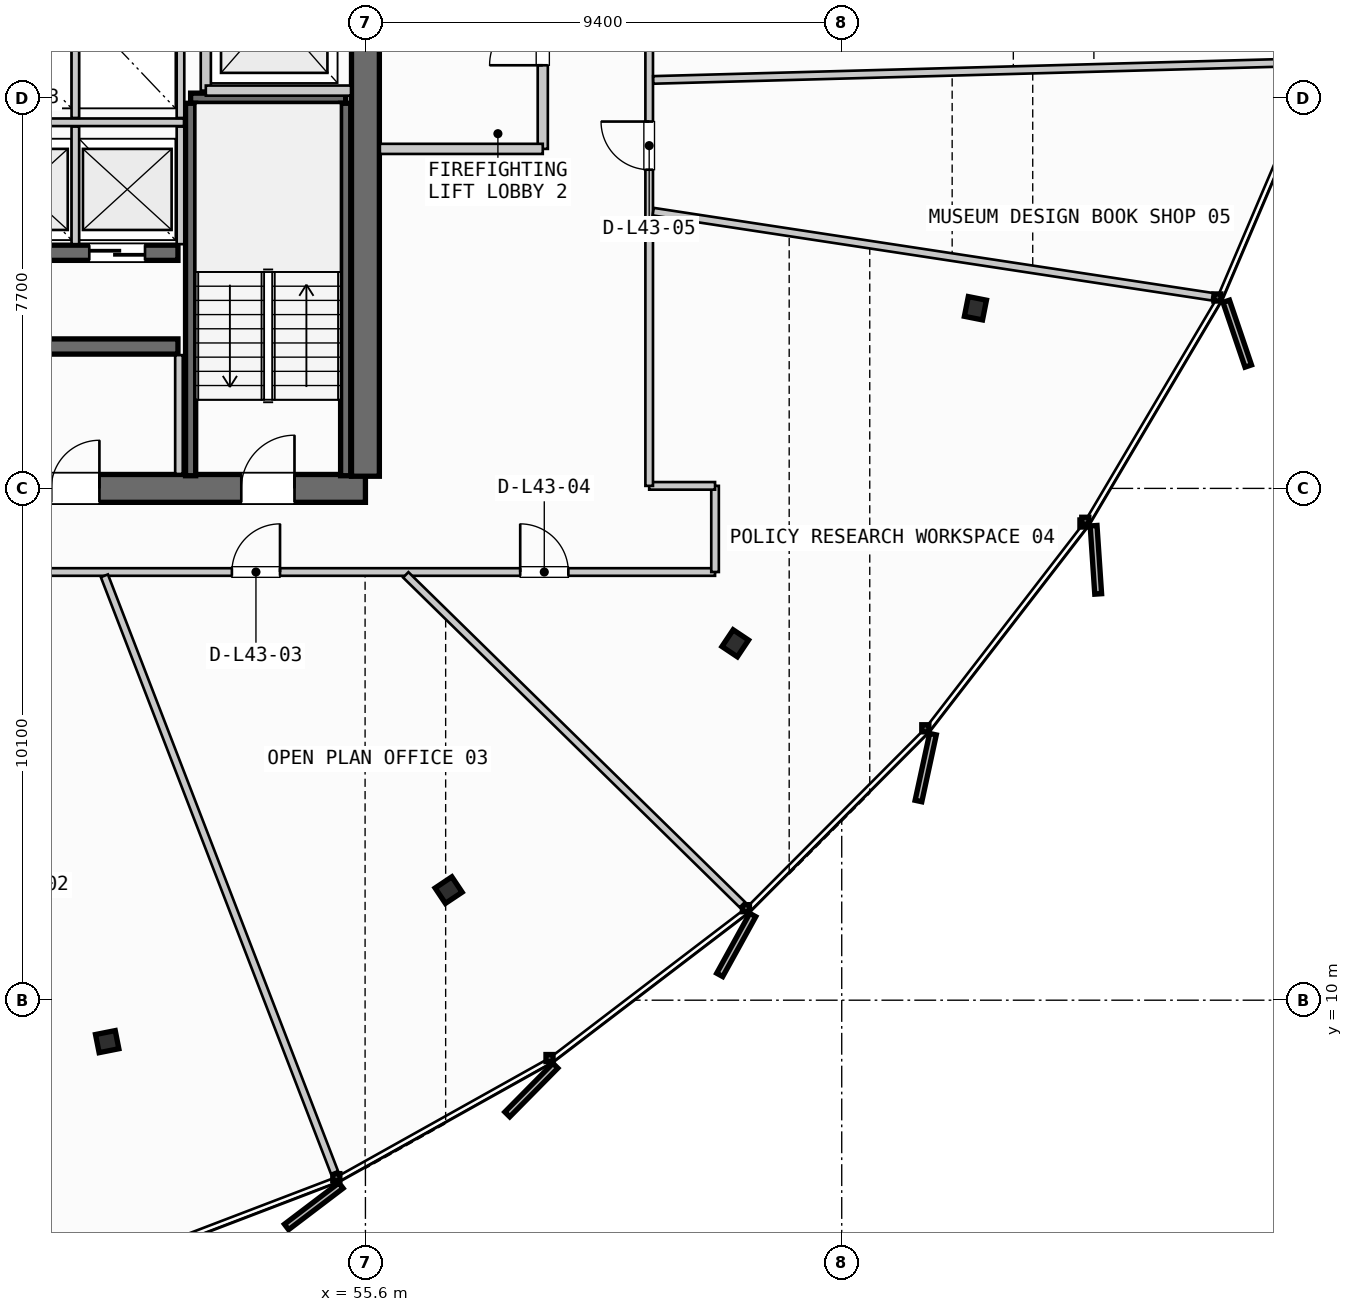
"""IFC4 building model, lengths in metres.
Left out: names, types, materials, properties, quantities, classifications, styles, units other than length and angle.
Written with IfcOpenShell. Run it as: python <this file> out.ifc"""

import sys

from ifc_helpers import new_model, si_unit, direction, frame, frame_2d, origin, origin_2d, place, context, subcontext, project, spatial, rectangle, i_section, extrude, source, transform, mapped, element, fill, save


model = new_model("IFC4")
c1 = context("Model", 3, precision=1e-05, world=origin(), true_north=direction((0.0, 1.0)))
c2 = subcontext(c1, "Body", "Model", "MODEL_VIEW")
j1 = project(units=[si_unit("LENGTHUNIT", "METRE"), si_unit("PLANEANGLEUNIT", "RADIAN")], contexts=[c1])
p1 = place(None, origin())
s1 = spatial("IfcSite", under=j1, at=p1, CompositionType="ELEMENT")
p2 = place(p1, origin())
s2 = spatial("IfcBuilding", under=s1, at=p2, CompositionType="ELEMENT")
p3 = place(p2, frame((0.0, 0.0, 167.85)))
s3 = spatial("IfcBuildingStorey", under=s2, at=p3, CompositionType="ELEMENT", Elevation=167.85)
p4 = place(p3, frame((38.0, 20.1, 0.0), z_axis=(0.0, 0.0, 1.0), x_axis=(1.0, 0.0, 0.0)))
e1 = element("IfcWall", 1, at=p4, inside=s3, PredefinedType="SHEAR", context=c2, shape_type="SweptSolid", body=[
    extrude(rectangle(XDim=17.6, YDim=0.55, at=frame_2d((8.8, 0.0))), origin(), (0.0, 0.0, 1.0), 3.24),
])
p5 = place(p4, frame((1.4, 0.0, 0.0)))
e2 = element("IfcOpeningElement", 2, at=p5, cuts=e1, PredefinedType="OPENING", context=c2, shape_type="SweptSolid", body=[
    extrude(rectangle(XDim=1.05, YDim=2.15, at=frame_2d((0.525, 1.075))), frame((0.0, 0.285, 0.0), z_axis=(0.0, -1.0, 0.0), x_axis=(1.0, 0.0, 0.0)), (0.0, 0.0, 1.0), 0.57),
])
p6 = place(p4, frame((15.15, 0.0, 0.0)))
e3 = element("IfcOpeningElement", 3, at=p6, cuts=e1, PredefinedType="OPENING", context=c2, shape_type="SweptSolid", body=[
    extrude(rectangle(XDim=1.05, YDim=2.15, at=frame_2d((0.525, 1.075))), frame((0.0, 0.285, 0.0), z_axis=(0.0, -1.0, 0.0), x_axis=(1.0, 0.0, 0.0)), (0.0, 0.0, 1.0), 0.57),
])
p7 = place(p4, frame((5.25, 0.0, 0.0)))
e4 = element("IfcOpeningElement", 4, at=p7, cuts=e1, PredefinedType="OPENING", context=c2, shape_type="SweptSolid", body=[
    extrude(rectangle(XDim=0.95, YDim=2.15, at=frame_2d((0.475, 1.075))), frame((0.0, 0.285, 0.0), z_axis=(0.0, -1.0, 0.0), x_axis=(1.0, 0.0, 0.0)), (0.0, 0.0, 1.0), 0.57),
])
p8 = place(p4, frame((11.4, 0.0, 0.0)))
e5 = element("IfcOpeningElement", 5, at=p8, cuts=e1, PredefinedType="OPENING", context=c2, shape_type="SweptSolid", body=[
    extrude(rectangle(XDim=0.95, YDim=2.15, at=frame_2d((0.475, 1.075))), frame((0.0, 0.285, 0.0), z_axis=(0.0, -1.0, 0.0), x_axis=(1.0, 0.0, 0.0)), (0.0, 0.0, 1.0), 0.57),
])
p9 = place(p3, frame((55.6, 20.34, 0.0), z_axis=(0.0, 0.0, 1.0), x_axis=(0.0, 1.0, 0.0)))
e6 = element("IfcWall", 6, at=p9, inside=s3, PredefinedType="SHEAR", context=c2, shape_type="SweptSolid", body=[
    extrude(rectangle(XDim=14.92, YDim=0.55, at=frame_2d((7.46, 0.0))), origin(), (0.0, 0.0, 1.0), 3.24),
])
p10 = place(p9, frame((12.71, 0.0, 0.0)))
e7 = element("IfcOpeningElement", 7, at=p10, cuts=e6, PredefinedType="OPENING", context=c2, shape_type="SweptSolid", body=[
    extrude(rectangle(XDim=1.05, YDim=2.15, at=frame_2d((0.525, 1.075))), frame((0.0, 0.285, 0.0), z_axis=(0.0, -1.0, 0.0), x_axis=(1.0, 0.0, 0.0)), (0.0, 0.0, 1.0), 0.57),
])
p11 = place(p9, frame((8.61, 0.0, 0.0)))
e8 = element("IfcOpeningElement", 8, at=p11, cuts=e6, PredefinedType="OPENING", context=c2, shape_type="SweptSolid", body=[
    extrude(rectangle(XDim=1.1, YDim=2.2, at=frame_2d((0.55, 1.1))), frame((0.0, 0.285, 0.0), z_axis=(0.0, -1.0, 0.0), x_axis=(1.0, 0.0, 0.0)), (0.0, 0.0, 1.0), 0.57),
])
p12 = place(p3, frame((47.65, 22.9, 0.0), z_axis=(0.0, 0.0, 1.0), x_axis=(1.0, 0.0, 0.0)))
e9 = element("IfcWall", 9, at=p12, inside=s3, PredefinedType="SHEAR", context=c2, shape_type="SweptSolid", body=[
    extrude(rectangle(XDim=4.25, YDim=0.3, at=frame_2d((2.125, 0.0))), origin(), (0.0, 0.0, 1.0), 3.24),
])
p13 = place(p3, frame((47.65, 24.75, 0.0), z_axis=(0.0, 0.0, 1.0), x_axis=(1.0, 0.0, 0.0)))
e10 = element("IfcWall", 10, at=p13, inside=s3, PredefinedType="SHEAR", context=c2, shape_type="SweptSolid", body=[
    extrude(rectangle(XDim=4.25, YDim=0.3, at=frame_2d((2.125, 0.0))), origin(), (0.0, 0.0, 1.0), 3.24),
])
p14 = place(p13, frame((0.45, 0.0, 0.0)))
e11 = element("IfcOpeningElement", 11, at=p14, cuts=e10, PredefinedType="OPENING", context=c2, shape_type="SweptSolid", body=[
    extrude(rectangle(XDim=1.1, YDim=2.2, at=frame_2d((0.55, 1.1))), frame((0.0, 0.16, 0.0), z_axis=(0.0, -1.0, 0.0), x_axis=(1.0, 0.0, 0.0)), (0.0, 0.0, 1.0), 0.32),
])
p15 = place(p13, frame((2.5, 0.0, 0.0)))
e12 = element("IfcOpeningElement", 12, at=p15, cuts=e10, PredefinedType="OPENING", context=c2, shape_type="SweptSolid", body=[
    extrude(rectangle(XDim=1.1, YDim=2.2, at=frame_2d((0.55, 1.1))), frame((0.0, 0.16, 0.0), z_axis=(0.0, -1.0, 0.0), x_axis=(1.0, 0.0, 0.0)), (0.0, 0.0, 1.0), 0.32),
])
m1 = source(origin(), c2, "Body", "SweptSolid", [
    extrude(i_section(OverallWidth=0.397, OverallDepth=0.365, WebThickness=0.028, FlangeThickness=0.044, FilletRadius=0.015, at=origin_2d()), origin(), (0.0, 0.0, 1.0), 3.24),
])
for number, where, z_axis, x_axis in (
    (13, (50.503, 9.182, 0.0), (0.0, 0.0, 1.0), (0.195, -0.981, 0.0)),
    (14, (57.242, 12.172, 0.0), (0.0, 0.0, 1.0), (0.556, -0.831, 0.0)),
    (15, (62.899, 17.043, 0.0), (0.0, 0.0, 1.0), (0.831, -0.556, 0.0)),
    (16, (67.639, 23.655, 0.0), (0.0, 0.0, 1.0), (0.981, -0.195, 0.0)),
):
    element("IfcColumn", number, at=place(p3, frame(where, z_axis=z_axis, x_axis=x_axis)), inside=s3, PredefinedType="COLUMN", context=c2, shape_type="MappedRepresentation", body=[
        mapped(m1, transform((0.0, 0.0, 0.0), scale=1.0)),
    ])
p16 = place(p3, frame((52.15, 27.8, 0.0), z_axis=(0.0, 0.0, 1.0), x_axis=(1.0, 0.0, 0.0)))
e17 = element("IfcWall", 17, at=p16, inside=s3, PredefinedType="SHEAR", context=c2, shape_type="SweptSolid", body=[
    extrude(rectangle(XDim=3.06, YDim=0.2, at=frame_2d((1.53, 0.0))), origin(), (0.0, 0.0, 1.0), 3.24),
])
for number, where, z_axis, x_axis in (
    (18, (55.21, 27.7, 0.0), (0.0, 0.0, 1.0), (0.0, -1.0, 0.0)),
    (19, (52.15, 20.35, 0.0), (0.0, 0.0, 1.0), (0.0, 1.0, 0.0)),
):
    element("IfcWall", number, at=place(p3, frame(where, z_axis=z_axis, x_axis=x_axis)), inside=s3, PredefinedType="SHEAR", context=c2, shape_type="SweptSolid", body=[
        extrude(rectangle(XDim=7.35, YDim=0.2, at=frame_2d((3.675, 0.0))), origin(), (0.0, 0.0, 1.0), 3.24),
    ])
p17 = place(p3, frame((52.45, 27.95, 0.0), z_axis=(0.0, 0.0, 1.0), x_axis=(0.0, 1.0, 0.0)))
e20 = element("IfcWall", 20, at=p17, inside=s3, PredefinedType="PARTITIONING", context=c2, shape_type="SweptSolid", body=[
    extrude(rectangle(XDim=3.1, YDim=0.2, at=frame_2d((1.55, 0.0))), origin(), (0.0, 0.0, 1.0), 2.28),
])
p18 = place(p3, frame((52.45, 27.95, 0.0), z_axis=(0.0, 0.0, 1.0), x_axis=(1.0, 0.0, 0.0)))
e21 = element("IfcWall", 21, at=p18, inside=s3, PredefinedType="PARTITIONING", context=c2, shape_type="SweptSolid", body=[
    extrude(rectangle(XDim=2.865, YDim=0.2, at=frame_2d((1.433, 0.0))), origin(), (0.0, 0.0, 1.0), 2.28),
])
p19 = place(p3, frame((59.1, 26.8, 0.0), z_axis=(0.0, 0.0, 1.0), x_axis=(0.0, 1.0, 0.0)))
e22 = element("IfcWall", 22, at=p19, inside=s3, PredefinedType="PARTITIONING", context=c2, shape_type="SweptSolid", body=[
    extrude(rectangle(XDim=4.4, YDim=0.2, at=frame_2d((2.2, 0.0))), origin(), (0.0, 0.0, 1.0), 2.28),
])
p20 = place(p19, frame((1.65, 0.0, 0.0)))
e23 = element("IfcOpeningElement", 23, at=p20, cuts=e22, PredefinedType="OPENING", context=c2, shape_type="SweptSolid", body=[
    extrude(rectangle(XDim=1.05, YDim=2.15, at=frame_2d((0.525, 1.075))), frame((0.0, 0.11, 0.0), z_axis=(0.0, -1.0, 0.0), x_axis=(1.0, 0.0, 0.0)), (0.0, 0.0, 1.0), 0.22),
])
p21 = place(p3, frame((55.885, 26.8, 0.0), z_axis=(0.0, 0.0, 1.0), x_axis=(1.0, 0.0, 0.0)))
e24 = element("IfcWall", 24, at=p21, inside=s3, PredefinedType="PARTITIONING", context=c2, shape_type="SweptSolid", body=[
    extrude(rectangle(XDim=3.215, YDim=0.2, at=frame_2d((1.607, 0.0))), origin(), (0.0, 0.0, 1.0), 2.28),
])
p22 = place(p3, frame((51.92, 20.385, 0.0), z_axis=(0.0, 0.0, 1.0), x_axis=(0.0, 1.0, 0.0)))
e25 = element("IfcWall", 25, at=p22, inside=s3, PredefinedType="PARTITIONING", context=c2, shape_type="SweptSolid", body=[
    extrude(rectangle(XDim=2.345, YDim=0.15, at=frame_2d((1.172, 0.0))), origin(), (0.0, 0.0, 1.0), 2.28),
])
p23 = place(p3, frame((47.7, 27.325, 0.0), z_axis=(0.0, 0.0, 1.0), x_axis=(1.0, 0.0, 0.0)))
e26 = element("IfcWall", 26, at=p23, inside=s3, PredefinedType="PARTITIONING", context=c2, shape_type="SweptSolid", body=[
    extrude(rectangle(XDim=4.32, YDim=0.15, at=frame_2d((2.16, 0.0))), origin(), (0.0, 0.0, 1.0), 2.28),
])
for number, where, z_axis, x_axis in (
    (27, (49.875, 24.92, 0.0), (0.0, 0.0, 1.0), (0.0, 1.0, 0.0)),
    (28, (51.95, 24.92, 0.0), (0.0, 0.0, 1.0), (0.0, 1.0, 0.0)),
):
    element("IfcWall", number, at=place(p3, frame(where, z_axis=z_axis, x_axis=x_axis)), inside=s3, PredefinedType="PARTITIONING", context=c2, shape_type="SweptSolid", body=[
        extrude(rectangle(XDim=2.32, YDim=0.15, at=frame_2d((1.16, 0.0))), origin(), (0.0, 0.0, 1.0), 2.28),
    ])
for number, where, z_axis, x_axis in (
    (29, (49.875, 27.41, 0.0), (0.0, 0.0, 1.0), (0.0, 1.0, 0.0)),
    (30, (51.95, 27.41, 0.0), (0.0, 0.0, 1.0), (0.0, 1.0, 0.0)),
):
    element("IfcWall", number, at=place(p3, frame(where, z_axis=z_axis, x_axis=x_axis)), inside=s3, PredefinedType="PARTITIONING", context=c2, shape_type="SweptSolid", body=[
        extrude(rectangle(XDim=2.27, YDim=0.15, at=frame_2d((1.135, 0.0))), origin(), (0.0, 0.0, 1.0), 2.28),
    ])
p24 = place(p3, frame((31.1, 18.45, 0.0), z_axis=(0.0, 0.0, 1.0), x_axis=(1.0, 0.0, 0.0)))
e31 = element("IfcWall", 31, at=p24, inside=s3, PredefinedType="PARTITIONING", context=c2, shape_type="SweptSolid", body=[
    extrude(rectangle(XDim=31.4, YDim=0.15, at=frame_2d((15.7, 0.0))), origin(), (0.0, 0.0, 1.0), 2.28),
])
p25 = place(p24, frame((7.969, 0.0, 0.0)))
e32 = element("IfcOpeningElement", 32, at=p25, cuts=e31, PredefinedType="OPENING", context=c2, shape_type="SweptSolid", body=[
    extrude(rectangle(XDim=0.95, YDim=2.15, at=frame_2d((0.475, 1.075))), frame((0.0, 0.085, 0.0), z_axis=(0.0, -1.0, 0.0), x_axis=(1.0, 0.0, 0.0)), (0.0, 0.0, 1.0), 0.17),
])
p26 = place(p24, frame((15.128, 0.0, 0.0)))
e33 = element("IfcOpeningElement", 33, at=p26, cuts=e31, PredefinedType="OPENING", context=c2, shape_type="SweptSolid", body=[
    extrude(rectangle(XDim=0.95, YDim=2.15, at=frame_2d((0.475, 1.075))), frame((0.0, 0.085, 0.0), z_axis=(0.0, -1.0, 0.0), x_axis=(1.0, 0.0, 0.0)), (0.0, 0.0, 1.0), 0.17),
])
p27 = place(p24, frame((21.865, 0.0, 0.0)))
e34 = element("IfcOpeningElement", 34, at=p27, cuts=e31, PredefinedType="OPENING", context=c2, shape_type="SweptSolid", body=[
    extrude(rectangle(XDim=0.95, YDim=2.15, at=frame_2d((0.475, 1.075))), frame((0.0, 0.085, 0.0), z_axis=(0.0, -1.0, 0.0), x_axis=(1.0, 0.0, 0.0)), (0.0, 0.0, 1.0), 0.17),
])
p28 = place(p24, frame((27.555, 0.0, 0.0)))
e35 = element("IfcOpeningElement", 35, at=p28, cuts=e31, PredefinedType="OPENING", context=c2, shape_type="SweptSolid", body=[
    extrude(rectangle(XDim=0.95, YDim=2.15, at=frame_2d((0.475, 1.075))), frame((0.0, 0.085, 0.0), z_axis=(0.0, -1.0, 0.0), x_axis=(1.0, 0.0, 0.0)), (0.0, 0.0, 1.0), 0.17),
])
p29 = place(p3, frame((62.5, 18.45, 0.0), z_axis=(0.0, 0.0, 1.0), x_axis=(0.0, 1.0, 0.0)))
e36 = element("IfcWall", 36, at=p29, inside=s3, PredefinedType="PARTITIONING", context=c2, shape_type="SweptSolid", body=[
    extrude(rectangle(XDim=1.7, YDim=0.15, at=frame_2d((0.85, 0.0))), origin(), (0.0, 0.0, 1.0), 2.28),
])
p30 = place(p3, frame((62.5, 20.15, 0.0), z_axis=(0.0, 0.0, 1.0), x_axis=(-1.0, 0.0, 0.0)))
e37 = element("IfcWall", 37, at=p30, inside=s3, PredefinedType="PARTITIONING", context=c2, shape_type="SweptSolid", body=[
    extrude(rectangle(XDim=1.3, YDim=0.15, at=frame_2d((0.65, 0.0))), origin(), (0.0, 0.0, 1.0), 2.28),
])
p31 = place(p3, frame((61.2, 20.15, 0.0), z_axis=(0.0, 0.0, 1.0), x_axis=(0.0, 1.0, 0.0)))
e38 = element("IfcWall", 38, at=p31, inside=s3, PredefinedType="PARTITIONING", context=c2, shape_type="SweptSolid", body=[
    extrude(rectangle(XDim=15.3, YDim=0.15, at=frame_2d((7.65, 0.0))), origin(), (0.0, 0.0, 1.0), 2.28),
])
p32 = place(p31, frame((6.24, 0.0, 0.0)))
e39 = element("IfcOpeningElement", 39, at=p32, cuts=e38, PredefinedType="OPENING", context=c2, shape_type="SweptSolid", body=[
    extrude(rectangle(XDim=0.95, YDim=2.15, at=frame_2d((0.475, 1.075))), frame((0.0, 0.085, 0.0), z_axis=(0.0, -1.0, 0.0), x_axis=(1.0, 0.0, 0.0)), (0.0, 0.0, 1.0), 0.17),
])
p33 = place(p31, frame((10.889, 0.0, 0.0)))
e40 = element("IfcOpeningElement", 40, at=p33, cuts=e38, PredefinedType="OPENING", context=c2, shape_type="SweptSolid", body=[
    extrude(rectangle(XDim=0.95, YDim=2.15, at=frame_2d((0.475, 1.075))), frame((0.0, 0.085, 0.0), z_axis=(0.0, -1.0, 0.0), x_axis=(1.0, 0.0, 0.0)), (0.0, 0.0, 1.0), 0.17),
])
p34 = place(p3, frame((50.448, 18.375, 0.0), z_axis=(0.0, 0.0, 1.0), x_axis=(0.359868219022, -0.933003143048, 0.0)))
e41 = element("IfcWall", 41, at=p34, inside=s3, PredefinedType="PARTITIONING", context=c2, shape_type="SweptSolid", body=[
    extrude(rectangle(XDim=12.62, YDim=0.15, at=frame_2d((6.31, 0.0))), origin(), (0.0, 0.0, 1.0), 2.28),
])
p35 = place(p3, frame((56.396, 18.394, 0.0), z_axis=(0.0, 0.0, 1.0), x_axis=(0.7142249136, -0.699916261272, 0.0)))
e42 = element("IfcWall", 42, at=p35, inside=s3, PredefinedType="PARTITIONING", context=c2, shape_type="SweptSolid", body=[
    extrude(rectangle(XDim=9.299, YDim=0.15, at=frame_2d((4.649, 0.0))), origin(), (0.0, 0.0, 1.0), 2.28),
])
p36 = place(p3, frame((61.279, 25.562, 0.0), z_axis=(0.0, 0.0, 1.0), x_axis=(0.988621170769, -0.150426662225, 0.0)))
e43 = element("IfcWall", 43, at=p36, inside=s3, PredefinedType="PARTITIONING", context=c2, shape_type="SweptSolid", body=[
    extrude(rectangle(XDim=11.163, YDim=0.15, at=frame_2d((5.582, 0.0))), origin(), (0.0, 0.0, 1.0), 2.28),
])
p37 = place(p3, frame((61.28, 28.161, 0.0), z_axis=(0.0, 0.0, 1.0), x_axis=(0.999631059962, 0.027161442505, 0.0)))
e44 = element("IfcWall", 44, at=p37, inside=s3, PredefinedType="PARTITIONING", context=c2, shape_type="SweptSolid", body=[
    extrude(rectangle(XDim=13.024, YDim=0.15, at=frame_2d((6.512, 0.0))), origin(), (0.0, 0.0, 1.0), 2.28),
])
m2 = source(origin(), c2, "Body", "SweptSolid", [
    extrude(rectangle(XDim=1.05, YDim=2.15, at=frame_2d((0.525, 1.075))), frame((0.0, 0.025, 0.0), z_axis=(0.0, -1.0, 0.0), x_axis=(1.0, 0.0, 0.0)), (0.0, 0.0, 1.0), 0.05),
])
p38 = place(p6, origin())
e45 = element("IfcDoor", 45, at=p38, inside=s3, OperationType="SINGLE_SWING_RIGHT", PredefinedType="DOOR", context=c2, shape_type="MappedRepresentation", body=[
    mapped(m2, transform((0.0, 0.0, 0.0), scale=1.0)),
])
fill(e3, e45)
m3 = source(origin(), c2, "Body", "SweptSolid", [
    extrude(rectangle(XDim=0.95, YDim=2.15, at=frame_2d((0.475, 1.075))), frame((0.0, 0.025, 0.0), z_axis=(0.0, -1.0, 0.0), x_axis=(1.0, 0.0, 0.0)), (0.0, 0.0, 1.0), 0.05),
])
p39 = place(p8, origin())
e46 = element("IfcDoor", 46, at=p39, inside=s3, OperationType="SINGLE_SWING_RIGHT", PredefinedType="DOOR", context=c2, shape_type="MappedRepresentation", body=[
    mapped(m3, transform((0.0, 0.0, 0.0), scale=1.0)),
])
fill(e5, e46)
m4 = source(origin(), c2, "Body", "SweptSolid", [
    extrude(rectangle(XDim=1.1, YDim=2.2, at=frame_2d((0.55, 1.1))), frame((0.0, 0.025, 0.0), z_axis=(0.0, -1.0, 0.0), x_axis=(1.0, 0.0, 0.0)), (0.0, 0.0, 1.0), 0.05),
])
p40 = place(p15, origin())
e47 = element("IfcDoor", 47, at=p40, inside=s3, OperationType="SLIDING_TO_RIGHT", PredefinedType="DOOR", context=c2, shape_type="MappedRepresentation", body=[
    mapped(m4, transform((0.0, 0.0, 0.0), scale=1.0)),
])
fill(e12, e47)
p41 = place(p20, origin())
e48 = element("IfcDoor", 48, at=p41, inside=s3, OperationType="SINGLE_SWING_LEFT", PredefinedType="DOOR", context=c2, shape_type="MappedRepresentation", body=[
    mapped(m2, transform((0.0, 0.0, 0.0), scale=1.0)),
])
fill(e23, e48)
p42 = place(p27, origin())
e49 = element("IfcDoor", 49, at=p42, inside=s3, OperationType="SINGLE_SWING_RIGHT", PredefinedType="DOOR", context=c2, shape_type="MappedRepresentation", body=[
    mapped(m3, transform((0.0, 0.0, 0.0), scale=1.0)),
])
fill(e34, e49)
p43 = place(p28, origin())
e50 = element("IfcDoor", 50, at=p43, inside=s3, OperationType="SINGLE_SWING_LEFT", PredefinedType="DOOR", context=c2, shape_type="MappedRepresentation", body=[
    mapped(m3, transform((0.0, 0.0, 0.0), scale=1.0)),
])
fill(e35, e50)
p44 = place(p32, origin())
e51 = element("IfcDoor", 51, at=p44, inside=s3, OperationType="SINGLE_SWING_RIGHT", PredefinedType="DOOR", context=c2, shape_type="MappedRepresentation", body=[
    mapped(m3, transform((0.0, 0.0, 0.0), scale=1.0)),
])
fill(e39, e51)
save(model, sys.argv[1])
